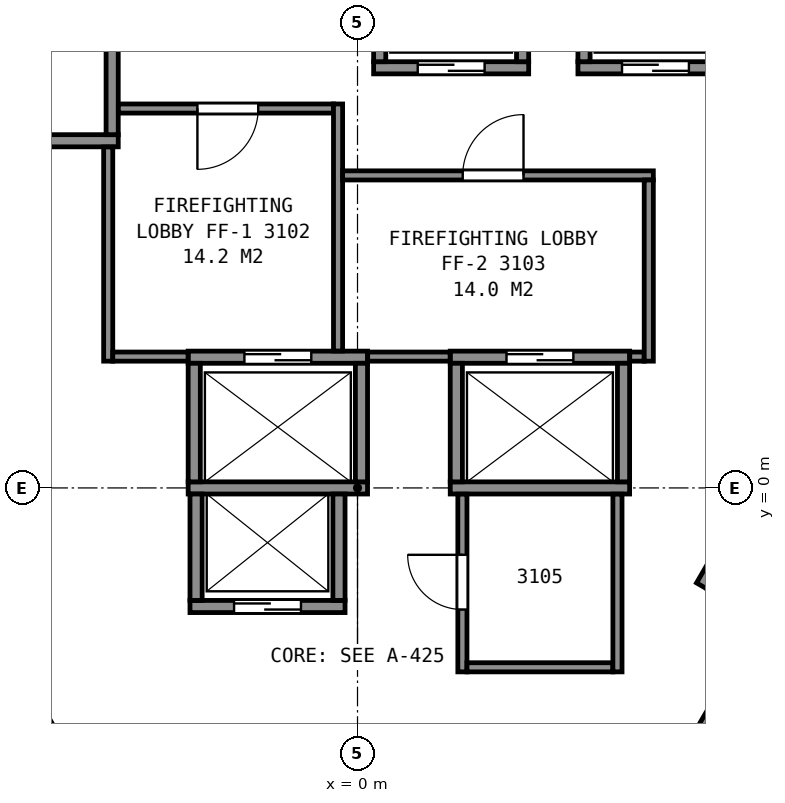
"""IFC4 building model, lengths in metres.
Left out: names, types, materials, properties, quantities, classifications, styles, units other than length and angle.
Written with IfcOpenShell. Run it as: python <this file> out.ifc"""

import sys

from ifc_helpers import new_model, si_unit, direction, frame, frame_2d, origin, place, context, subcontext, project, spatial, rectangle, extrude, element, fill, save


model = new_model("IFC4")
c1 = context("Model", 3, precision=1e-05, world=origin(), true_north=direction((0.0, 1.0)))
c2 = subcontext(c1, "Body", "Model", "MODEL_VIEW")
j1 = project(units=[si_unit("LENGTHUNIT", "METRE"), si_unit("PLANEANGLEUNIT", "RADIAN")], contexts=[c1])
p1 = place(None, origin())
s1 = spatial("IfcSite", under=j1, at=p1, CompositionType="ELEMENT")
p2 = place(p1, origin())
s2 = spatial("IfcBuilding", under=s1, at=p2, CompositionType="ELEMENT")
p3 = place(p2, frame((0.0, 0.0, 128.8)))
s3 = spatial("IfcBuildingStorey", under=s2, at=p3, CompositionType="ELEMENT", Elevation=128.8)
p4 = place(p3, frame((-2.755, -1.95, 0.0), z_axis=(0.0, 0.0, 1.0), x_axis=(1.0, 0.0, 0.0)))
e1 = element("IfcWall", 1, at=p4, inside=s3, PredefinedType="PARTITIONING", context=c2, shape_type="SweptSolid", body=[
    extrude(rectangle(XDim=2.55, YDim=0.2, at=frame_2d((1.275, 0.0))), origin(), (0.0, 0.0, 1.0), 3.6),
])
p5 = place(p4, frame((0.725, 0.0, 0.0)))
e2 = element("IfcOpeningElement", 2, at=p5, cuts=e1, PredefinedType="OPENING", context=c2, shape_type="SweptSolid", body=[
    extrude(rectangle(XDim=1.1, YDim=2.1, at=frame_2d((0.55, 1.05))), frame((0.0, 0.11, 0.0), z_axis=(0.0, -1.0, 0.0), x_axis=(1.0, 0.0, 0.0)), (0.0, 0.0, 1.0), 0.22),
])
p6 = place(p3, frame((-2.785, 0.0, 0.0), z_axis=(0.0, 0.0, 1.0), x_axis=(1.0, 0.0, 0.0)))
e3 = element("IfcWall", 3, at=p6, inside=s3, PredefinedType="PARTITIONING", context=c2, shape_type="SweptSolid", body=[
    extrude(rectangle(XDim=2.95, YDim=0.2, at=frame_2d((1.475, 0.0))), origin(), (0.0, 0.0, 1.0), 3.6),
])
p7 = place(p3, frame((1.525, 0.0, 0.0), z_axis=(0.0, 0.0, 1.0), x_axis=(1.0, 0.0, 0.0)))
e4 = element("IfcWall", 4, at=p7, inside=s3, PredefinedType="PARTITIONING", context=c2, shape_type="SweptSolid", body=[
    extrude(rectangle(XDim=2.95, YDim=0.2, at=frame_2d((1.475, 0.0))), origin(), (0.0, 0.0, 1.0), 3.6),
])
p8 = place(p3, frame((-2.785, 2.15, 0.0), z_axis=(0.0, 0.0, 1.0), x_axis=(1.0, 0.0, 0.0)))
e5 = element("IfcWall", 5, at=p8, inside=s3, PredefinedType="PARTITIONING", context=c2, shape_type="SweptSolid", body=[
    extrude(rectangle(XDim=2.95, YDim=0.2, at=frame_2d((1.475, 0.0))), origin(), (0.0, 0.0, 1.0), 3.6),
])
p9 = place(p8, frame((0.925, 0.0, 0.0)))
e6 = element("IfcOpeningElement", 6, at=p9, cuts=e5, PredefinedType="OPENING", context=c2, shape_type="SweptSolid", body=[
    extrude(rectangle(XDim=1.1, YDim=2.1, at=frame_2d((0.55, 1.05))), frame((0.0, 0.11, 0.0), z_axis=(0.0, -1.0, 0.0), x_axis=(1.0, 0.0, 0.0)), (0.0, 0.0, 1.0), 0.22),
])
p10 = place(p3, frame((1.525, 2.15, 0.0), z_axis=(0.0, 0.0, 1.0), x_axis=(1.0, 0.0, 0.0)))
e7 = element("IfcWall", 7, at=p10, inside=s3, PredefinedType="PARTITIONING", context=c2, shape_type="SweptSolid", body=[
    extrude(rectangle(XDim=2.95, YDim=0.2, at=frame_2d((1.475, 0.0))), origin(), (0.0, 0.0, 1.0), 3.6),
])
p11 = place(p10, frame((0.925, 0.0, 0.0)))
e8 = element("IfcOpeningElement", 8, at=p11, cuts=e7, PredefinedType="OPENING", context=c2, shape_type="SweptSolid", body=[
    extrude(rectangle(XDim=1.1, YDim=2.1, at=frame_2d((0.55, 1.05))), frame((0.0, 0.11, 0.0), z_axis=(0.0, -1.0, 0.0), x_axis=(1.0, 0.0, 0.0)), (0.0, 0.0, 1.0), 0.22),
])
p12 = place(p3, frame((-6.285, 5.71, 0.0), z_axis=(0.0, 0.0, 1.0), x_axis=(1.0, 0.0, 0.0)))
e9 = element("IfcWall", 9, at=p12, inside=s3, PredefinedType="PARTITIONING", context=c2, shape_type="SweptSolid", body=[
    extrude(rectangle(XDim=2.35, YDim=0.2, at=frame_2d((1.175, 0.0))), origin(), (0.0, 0.0, 1.0), 3.6),
])
p13 = place(p3, frame((0.265, 6.91, 0.0), z_axis=(0.0, 0.0, 1.0), x_axis=(1.0, 0.0, 0.0)))
e10 = element("IfcWall", 10, at=p13, inside=s3, PredefinedType="PARTITIONING", context=c2, shape_type="SweptSolid", body=[
    extrude(rectangle(XDim=2.55, YDim=0.2, at=frame_2d((1.275, 0.0))), origin(), (0.0, 0.0, 1.0), 3.6),
])
p14 = place(p13, frame((0.725, 0.0, 0.0)))
e11 = element("IfcOpeningElement", 11, at=p14, cuts=e10, PredefinedType="OPENING", context=c2, shape_type="SweptSolid", body=[
    extrude(rectangle(XDim=1.1, YDim=2.1, at=frame_2d((0.55, 1.05))), frame((0.0, 0.11, 0.0), z_axis=(0.0, -1.0, 0.0), x_axis=(1.0, 0.0, 0.0)), (0.0, 0.0, 1.0), 0.22),
])
p15 = place(p3, frame((3.625, 6.91, 0.0), z_axis=(0.0, 0.0, 1.0), x_axis=(1.0, 0.0, 0.0)))
e12 = element("IfcWall", 12, at=p15, inside=s3, PredefinedType="PARTITIONING", context=c2, shape_type="SweptSolid", body=[
    extrude(rectangle(XDim=2.55, YDim=0.2, at=frame_2d((1.275, 0.0))), origin(), (0.0, 0.0, 1.0), 3.6),
])
p16 = place(p15, frame((0.725, 0.0, 0.0)))
e13 = element("IfcOpeningElement", 13, at=p16, cuts=e12, PredefinedType="OPENING", context=c2, shape_type="SweptSolid", body=[
    extrude(rectangle(XDim=1.1, YDim=2.1, at=frame_2d((0.55, 1.05))), frame((0.0, 0.11, 0.0), z_axis=(0.0, -1.0, 0.0), x_axis=(1.0, 0.0, 0.0)), (0.0, 0.0, 1.0), 0.22),
])
p17 = place(p3, frame((5.527, -4.247, 0.0), z_axis=(0.0, 0.0, 1.0), x_axis=(0.499938297808, 0.866061024631, 0.0)))
e14 = element("IfcWall", 14, at=p17, inside=s3, PredefinedType="PARTITIONING", context=c2, shape_type="SweptSolid", body=[
    extrude(rectangle(XDim=2.35, YDim=0.2, at=frame_2d((1.175, 0.0))), origin(), (0.0, 0.0, 1.0), 3.6),
])
p18 = place(p17, frame((0.725, 0.0, 0.0)))
e15 = element("IfcOpeningElement", 15, at=p18, cuts=e14, PredefinedType="OPENING", context=c2, shape_type="SweptSolid", body=[
    extrude(rectangle(XDim=1.1, YDim=2.1, at=frame_2d((0.55, 1.05))), frame((0.0, 0.11, 0.0), z_axis=(0.0, -1.0, 0.0), x_axis=(1.0, 0.0, 0.0)), (0.0, 0.0, 1.0), 0.22),
])
p19 = place(p3, frame((5.663, -1.612, 0.0), z_axis=(0.0, 0.0, 1.0), x_axis=(0.49998122708, 0.866036242063, 0.0)))
e16 = element("IfcWall", 16, at=p19, inside=s3, PredefinedType="PARTITIONING", context=c2, shape_type="SweptSolid", body=[
    extrude(rectangle(XDim=4.9, YDim=0.2, at=frame_2d((2.45, 0.0))), origin(), (0.0, 0.0, 1.0), 3.6),
])
p20 = place(p3, frame((4.375, 0.1, 0.0), z_axis=(0.0, 0.0, 1.0), x_axis=(0.0, 1.0, 0.0)))
e17 = element("IfcWall", 17, at=p20, inside=s3, PredefinedType="PARTITIONING", context=c2, shape_type="SweptSolid", body=[
    extrude(rectangle(XDim=1.95, YDim=0.2, at=frame_2d((0.975, 0.0))), origin(), (0.0, 0.0, 1.0), 3.6),
])
for number, where, z_axis, x_axis in (
    (18, (3.725, 7.01, 0.0), (0.0, 0.0, 1.0), (0.0, 1.0, 0.0)),
    (19, (2.715, 7.01, 0.0), (0.0, 0.0, 1.0), (0.0, 1.0, 0.0)),
):
    element("IfcWall", number, at=place(p3, frame(where, z_axis=z_axis, x_axis=x_axis)), inside=s3, PredefinedType="PARTITIONING", context=c2, shape_type="SweptSolid", body=[
        extrude(rectangle(XDim=1.75, YDim=0.2, at=frame_2d((0.875, 0.0))), origin(), (0.0, 0.0, 1.0), 3.6),
    ])
p21 = place(p3, frame((1.625, 0.1, 0.0), z_axis=(0.0, 0.0, 1.0), x_axis=(0.0, 1.0, 0.0)))
e20 = element("IfcWall", 20, at=p21, inside=s3, PredefinedType="PARTITIONING", context=c2, shape_type="SweptSolid", body=[
    extrude(rectangle(XDim=1.95, YDim=0.2, at=frame_2d((0.975, 0.0))), origin(), (0.0, 0.0, 1.0), 3.6),
])
p22 = place(p3, frame((0.365, 7.01, 0.0), z_axis=(0.0, 0.0, 1.0), x_axis=(0.0, 1.0, 0.0)))
e21 = element("IfcWall", 21, at=p22, inside=s3, PredefinedType="PARTITIONING", context=c2, shape_type="SweptSolid", body=[
    extrude(rectangle(XDim=1.75, YDim=0.2, at=frame_2d((0.875, 0.0))), origin(), (0.0, 0.0, 1.0), 3.6),
])
p23 = place(p3, frame((0.065, 0.1, 0.0), z_axis=(0.0, 0.0, 1.0), x_axis=(0.0, 1.0, 0.0)))
e22 = element("IfcWall", 22, at=p23, inside=s3, PredefinedType="PARTITIONING", context=c2, shape_type="SweptSolid", body=[
    extrude(rectangle(XDim=1.95, YDim=0.2, at=frame_2d((0.975, 0.0))), origin(), (0.0, 0.0, 1.0), 3.6),
])
for number, where, z_axis, x_axis in (
    (23, (-0.305, -1.85, 0.0), (0.0, 0.0, 1.0), (0.0, 1.0, 0.0)),
    (24, (-2.655, -1.85, 0.0), (0.0, 0.0, 1.0), (0.0, 1.0, 0.0)),
):
    element("IfcWall", number, at=place(p3, frame(where, z_axis=z_axis, x_axis=x_axis)), inside=s3, PredefinedType="PARTITIONING", context=c2, shape_type="SweptSolid", body=[
        extrude(rectangle(XDim=1.75, YDim=0.2, at=frame_2d((0.875, 0.0))), origin(), (0.0, 0.0, 1.0), 3.6),
    ])
p24 = place(p3, frame((-2.685, 0.1, 0.0), z_axis=(0.0, 0.0, 1.0), x_axis=(0.0, 1.0, 0.0)))
e25 = element("IfcWall", 25, at=p24, inside=s3, PredefinedType="PARTITIONING", context=c2, shape_type="SweptSolid", body=[
    extrude(rectangle(XDim=1.95, YDim=0.2, at=frame_2d((0.975, 0.0))), origin(), (0.0, 0.0, 1.0), 3.6),
])
p25 = place(p3, frame((-4.035, 5.81, 0.0), z_axis=(0.0, 0.0, 1.0), x_axis=(0.0, 1.0, 0.0)))
e26 = element("IfcWall", 26, at=p25, inside=s3, PredefinedType="PARTITIONING", context=c2, shape_type="SweptSolid", body=[
    extrude(rectangle(XDim=1.75, YDim=0.2, at=frame_2d((0.875, 0.0))), origin(), (0.0, 0.0, 1.0), 3.6),
])
p26 = place(p3, frame((-13.664, 5.946, 0.0), z_axis=(0.0, 0.0, 1.0), x_axis=(0.499994327219, -0.866028678941, 0.0)))
e27 = element("IfcWall", 27, at=p26, inside=s3, PredefinedType="PARTITIONING", context=c2, shape_type="SweptSolid", body=[
    extrude(rectangle(XDim=23.968, YDim=0.2, at=frame_2d((11.984, 0.0))), origin(), (0.0, 0.0, 1.0), 3.35),
])
p27 = place(p3, frame((-4.091, -5.635, 0.0), z_axis=(0.0, 0.0, 1.0), x_axis=(-0.499948934428, 0.866054884499, 0.0)))
e28 = element("IfcWall", 28, at=p27, inside=s3, PredefinedType="PARTITIONING", context=c2, shape_type="SweptSolid", body=[
    extrude(rectangle(XDim=3.577, YDim=0.15, at=frame_2d((1.789, 0.0))), origin(), (0.0, 0.0, 1.0), 3.35),
])
p28 = place(p27, frame((2.377, 0.0, 0.0)))
e29 = element("IfcOpeningElement", 29, at=p28, cuts=e28, PredefinedType="OPENING", context=c2, shape_type="SweptSolid", body=[
    extrude(rectangle(XDim=0.9, YDim=2.1, at=frame_2d((0.45, 1.05))), frame((0.0, 0.085, 0.0), z_axis=(0.0, -1.0, 0.0), x_axis=(1.0, 0.0, 0.0)), (0.0, 0.0, 1.0), 0.17),
])
p29 = place(p27, frame((0.605, 0.0, 0.0)))
e30 = element("IfcOpeningElement", 30, at=p29, cuts=e28, PredefinedType="OPENING", context=c2, shape_type="SweptSolid", body=[
    extrude(rectangle(XDim=0.9, YDim=2.1, at=frame_2d((0.45, 1.05))), frame((0.0, 0.085, 0.0), z_axis=(0.0, -1.0, 0.0), x_axis=(1.0, 0.0, 0.0)), (0.0, 0.0, 1.0), 0.17),
])
p30 = place(p3, frame((-4.1, 2.085, 0.0), z_axis=(0.0, 0.0, 1.0), x_axis=(0.0, 1.0, 0.0)))
e31 = element("IfcWall", 31, at=p30, inside=s3, PredefinedType="PARTITIONING", context=c2, shape_type="SweptSolid", body=[
    extrude(rectangle(XDim=3.523, YDim=0.15, at=frame_2d((1.761, 0.0))), origin(), (0.0, 0.0, 1.0), 3.35),
])
p31 = place(p3, frame((-4.025, 2.16, 0.0), z_axis=(0.0, 0.0, 1.0), x_axis=(1.0, 0.0, 0.0)))
e32 = element("IfcWall", 32, at=p31, inside=s3, PredefinedType="PARTITIONING", context=c2, shape_type="SweptSolid", body=[
    extrude(rectangle(XDim=1.238, YDim=0.15, at=frame_2d((0.619, 0.0))), origin(), (0.0, 0.0, 1.0), 3.35),
])
p32 = place(p3, frame((-3.933, 6.24, 0.0), z_axis=(0.0, 0.0, 1.0), x_axis=(1.0, 0.0, 0.0)))
e33 = element("IfcWall", 33, at=p32, inside=s3, PredefinedType="PARTITIONING", context=c2, shape_type="SweptSolid", body=[
    extrude(rectangle(XDim=3.538, YDim=0.15, at=frame_2d((1.769, 0.0))), origin(), (0.0, 0.0, 1.0), 3.35),
])
p33 = place(p32, frame((1.3, 0.0, 0.0)))
e34 = element("IfcOpeningElement", 34, at=p33, cuts=e33, PredefinedType="OPENING", context=c2, shape_type="SweptSolid", body=[
    extrude(rectangle(XDim=1.0, YDim=2.1, at=frame_2d((0.5, 1.05))), frame((0.0, 0.085, 0.0), z_axis=(0.0, -1.0, 0.0), x_axis=(1.0, 0.0, 0.0)), (0.0, 0.0, 1.0), 0.17),
])
p34 = place(p3, frame((-0.32, 2.252, 0.0), z_axis=(0.0, 0.0, 1.0), x_axis=(0.0, 1.0, 0.0)))
e35 = element("IfcWall", 35, at=p34, inside=s3, PredefinedType="PARTITIONING", context=c2, shape_type="SweptSolid", body=[
    extrude(rectangle(XDim=4.063, YDim=0.15, at=frame_2d((2.031, 0.0))), origin(), (0.0, 0.0, 1.0), 3.35),
])
p35 = place(p3, frame((-0.245, 5.14, 0.0), z_axis=(0.0, 0.0, 1.0), x_axis=(1.0, 0.0, 0.0)))
e36 = element("IfcWall", 36, at=p35, inside=s3, PredefinedType="PARTITIONING", context=c2, shape_type="SweptSolid", body=[
    extrude(rectangle(XDim=5.11, YDim=0.15, at=frame_2d((2.555, 0.0))), origin(), (0.0, 0.0, 1.0), 3.35),
])
p36 = place(p35, frame((1.975, 0.0, 0.0)))
e37 = element("IfcOpeningElement", 37, at=p36, cuts=e36, PredefinedType="OPENING", context=c2, shape_type="SweptSolid", body=[
    extrude(rectangle(XDim=1.0, YDim=2.1, at=frame_2d((0.5, 1.05))), frame((0.0, 0.085, 0.0), z_axis=(0.0, -1.0, 0.0), x_axis=(1.0, 0.0, 0.0)), (0.0, 0.0, 1.0), 0.17),
])
p37 = place(p3, frame((0.167, 2.16, 0.0), z_axis=(0.0, 0.0, 1.0), x_axis=(1.0, 0.0, 0.0)))
e38 = element("IfcWall", 38, at=p37, inside=s3, PredefinedType="PARTITIONING", context=c2, shape_type="SweptSolid", body=[
    extrude(rectangle(XDim=1.356, YDim=0.15, at=frame_2d((0.678, 0.0))), origin(), (0.0, 0.0, 1.0), 3.35),
])
p38 = place(p3, frame((1.725, -0.102, 0.0), z_axis=(0.0, 0.0, 1.0), x_axis=(0.0, -1.0, 0.0)))
e39 = element("IfcWall", 39, at=p38, inside=s3, PredefinedType="PARTITIONING", context=c2, shape_type="SweptSolid", body=[
    extrude(rectangle(XDim=2.923, YDim=0.15, at=frame_2d((1.461, 0.0))), origin(), (0.0, 0.0, 1.0), 3.35),
])
p39 = place(p38, frame((0.998, 0.0, 0.0)))
e40 = element("IfcOpeningElement", 40, at=p39, cuts=e39, PredefinedType="OPENING", context=c2, shape_type="SweptSolid", body=[
    extrude(rectangle(XDim=0.9, YDim=2.1, at=frame_2d((0.45, 1.05))), frame((0.0, 0.085, 0.0), z_axis=(0.0, -1.0, 0.0), x_axis=(1.0, 0.0, 0.0)), (0.0, 0.0, 1.0), 0.17),
])
p40 = place(p3, frame((1.8, -2.95, 0.0), z_axis=(0.0, 0.0, 1.0), x_axis=(1.0, 0.0, 0.0)))
e41 = element("IfcWall", 41, at=p40, inside=s3, PredefinedType="PARTITIONING", context=c2, shape_type="SweptSolid", body=[
    extrude(rectangle(XDim=2.4, YDim=0.15, at=frame_2d((1.2, 0.0))), origin(), (0.0, 0.0, 1.0), 3.35),
])
p41 = place(p3, frame((4.275, -3.025, 0.0), z_axis=(0.0, 0.0, 1.0), x_axis=(0.0, 1.0, 0.0)))
e42 = element("IfcWall", 42, at=p41, inside=s3, PredefinedType="PARTITIONING", context=c2, shape_type="SweptSolid", body=[
    extrude(rectangle(XDim=2.923, YDim=0.15, at=frame_2d((1.461, 0.0))), origin(), (0.0, 0.0, 1.0), 3.35),
])
p42 = place(p3, frame((4.477, 2.16, 0.0), z_axis=(0.0, 0.0, 1.0), x_axis=(1.0, 0.0, 0.0)))
e43 = element("IfcWall", 43, at=p42, inside=s3, PredefinedType="PARTITIONING", context=c2, shape_type="SweptSolid", body=[
    extrude(rectangle(XDim=0.238, YDim=0.15, at=frame_2d((0.119, 0.0))), origin(), (0.0, 0.0, 1.0), 3.35),
])
p43 = place(p3, frame((4.79, 2.085, 0.0), z_axis=(0.0, 0.0, 1.0), x_axis=(0.0, 1.0, 0.0)))
e44 = element("IfcWall", 44, at=p43, inside=s3, PredefinedType="PARTITIONING", context=c2, shape_type="SweptSolid", body=[
    extrude(rectangle(XDim=2.98, YDim=0.15, at=frame_2d((1.49, 0.0))), origin(), (0.0, 0.0, 1.0), 3.35),
])
p44 = place(p3, frame((-3.756, -15.494, 0.0), z_axis=(0.0, 0.0, 1.0), x_axis=(-0.500027787016, 0.866009360349, 0.0)))
e45 = element("IfcWall", 45, at=p44, inside=s3, PredefinedType="PARTITIONING", context=c2, shape_type="SweptSolid", body=[
    extrude(rectangle(XDim=23.856, YDim=0.125, at=frame_2d((11.928, 0.0))), origin(), (0.0, 0.0, 1.0), 2.613),
])
p45 = place(p44, frame((10.016, 0.0, 0.0)))
e46 = element("IfcOpeningElement", 46, at=p45, cuts=e45, PredefinedType="OPENING", context=c2, shape_type="SweptSolid", body=[
    extrude(rectangle(XDim=1.0, YDim=2.1, at=frame_2d((0.5, 1.05))), frame((0.0, 0.073, 0.0), z_axis=(0.0, -1.0, 0.0), x_axis=(1.0, 0.0, 0.0)), (0.0, 0.0, 1.0), 0.145),
])
p46 = place(p44, frame((6.402, 0.0, 0.0)))
e47 = element("IfcOpeningElement", 47, at=p46, cuts=e45, PredefinedType="OPENING", context=c2, shape_type="SweptSolid", body=[
    extrude(rectangle(XDim=0.9, YDim=2.1, at=frame_2d((0.45, 1.05))), frame((0.0, 0.073, 0.0), z_axis=(0.0, -1.0, 0.0), x_axis=(1.0, 0.0, 0.0)), (0.0, 0.0, 1.0), 0.145),
])
p47 = place(p3, frame((15.684, 5.165, 0.0), z_axis=(0.0, 0.0, 1.0), x_axis=(-0.500027787016, -0.866009360349, 0.0)))
e48 = element("IfcWall", 48, at=p47, inside=s3, PredefinedType="PARTITIONING", context=c2, shape_type="SweptSolid", body=[
    extrude(rectangle(XDim=23.856, YDim=0.125, at=frame_2d((11.928, 0.0))), origin(), (0.0, 0.0, 1.0), 2.613),
])
p48 = place(p47, frame((21.493, 0.0, 0.0)))
e49 = element("IfcOpeningElement", 49, at=p48, cuts=e48, PredefinedType="OPENING", context=c2, shape_type="SweptSolid", body=[
    extrude(rectangle(XDim=1.0, YDim=2.1, at=frame_2d((0.5, 1.05))), frame((0.0, 0.073, 0.0), z_axis=(0.0, -1.0, 0.0), x_axis=(1.0, 0.0, 0.0)), (0.0, 0.0, 1.0), 0.145),
])
p49 = place(p47, frame((10.853, 0.0, 0.0)))
e50 = element("IfcOpeningElement", 50, at=p49, cuts=e48, PredefinedType="OPENING", context=c2, shape_type="SweptSolid", body=[
    extrude(rectangle(XDim=0.9, YDim=2.1, at=frame_2d((0.45, 1.05))), frame((0.0, 0.073, 0.0), z_axis=(0.0, -1.0, 0.0), x_axis=(1.0, 0.0, 0.0)), (0.0, 0.0, 1.0), 0.145),
])
p50 = place(p47, frame((6.558, 0.0, 0.0)))
e51 = element("IfcOpeningElement", 51, at=p50, cuts=e48, PredefinedType="OPENING", context=c2, shape_type="SweptSolid", body=[
    extrude(rectangle(XDim=1.0, YDim=2.1, at=frame_2d((0.5, 1.05))), frame((0.0, 0.073, 0.0), z_axis=(0.0, -1.0, 0.0), x_axis=(1.0, 0.0, 0.0)), (0.0, 0.0, 1.0), 0.145),
])
p51 = place(p14, origin())
e52 = element("IfcDoor", 52, at=p51, inside=s3, OperationType="SLIDING_TO_LEFT", PredefinedType="DOOR", context=c2, shape_type="SweptSolid", body=[
    extrude(rectangle(XDim=1.1, YDim=2.1, at=frame_2d((0.55, 1.05))), frame((0.0, 0.025, 0.0), z_axis=(0.0, -1.0, 0.0), x_axis=(1.0, 0.0, 0.0)), (0.0, 0.0, 1.0), 0.05),
])
fill(e11, e52)
p52 = place(p5, origin())
e53 = element("IfcDoor", 53, at=p52, inside=s3, OperationType="SLIDING_TO_RIGHT", PredefinedType="DOOR", context=c2, shape_type="SweptSolid", body=[
    extrude(rectangle(XDim=1.1, YDim=2.1, at=frame_2d((0.55, 1.05))), frame((0.0, 0.025, 0.0), z_axis=(0.0, -1.0, 0.0), x_axis=(1.0, 0.0, 0.0)), (0.0, 0.0, 1.0), 0.05),
])
fill(e2, e53)
p53 = place(p16, origin())
e54 = element("IfcDoor", 54, at=p53, inside=s3, OperationType="SLIDING_TO_LEFT", PredefinedType="DOOR", context=c2, shape_type="SweptSolid", body=[
    extrude(rectangle(XDim=1.1, YDim=2.1, at=frame_2d((0.55, 1.05))), frame((0.0, 0.025, 0.0), z_axis=(0.0, -1.0, 0.0), x_axis=(1.0, 0.0, 0.0)), (0.0, 0.0, 1.0), 0.05),
])
fill(e13, e54)
p54 = place(p9, origin())
e55 = element("IfcDoor", 55, at=p54, inside=s3, OperationType="SLIDING_TO_LEFT", PredefinedType="DOOR", context=c2, shape_type="SweptSolid", body=[
    extrude(rectangle(XDim=1.1, YDim=2.1, at=frame_2d((0.55, 1.05))), frame((0.0, 0.025, 0.0), z_axis=(0.0, -1.0, 0.0), x_axis=(1.0, 0.0, 0.0)), (0.0, 0.0, 1.0), 0.05),
])
fill(e6, e55)
p55 = place(p11, origin())
e56 = element("IfcDoor", 56, at=p55, inside=s3, OperationType="SLIDING_TO_RIGHT", PredefinedType="DOOR", context=c2, shape_type="SweptSolid", body=[
    extrude(rectangle(XDim=1.1, YDim=2.1, at=frame_2d((0.55, 1.05))), frame((0.0, 0.025, 0.0), z_axis=(0.0, -1.0, 0.0), x_axis=(1.0, 0.0, 0.0)), (0.0, 0.0, 1.0), 0.05),
])
fill(e8, e56)
p56 = place(p33, origin())
e57 = element("IfcDoor", 57, at=p56, inside=s3, OperationType="SINGLE_SWING_LEFT", PredefinedType="DOOR", context=c2, shape_type="SweptSolid", body=[
    extrude(rectangle(XDim=1.0, YDim=2.1, at=frame_2d((0.5, 1.05))), frame((0.0, 0.025, 0.0), z_axis=(0.0, -1.0, 0.0), x_axis=(1.0, 0.0, 0.0)), (0.0, 0.0, 1.0), 0.05),
])
fill(e34, e57)
p57 = place(p36, origin())
e58 = element("IfcDoor", 58, at=p57, inside=s3, OperationType="SINGLE_SWING_RIGHT", PredefinedType="DOOR", context=c2, shape_type="SweptSolid", body=[
    extrude(rectangle(XDim=1.0, YDim=2.1, at=frame_2d((0.5, 1.05))), frame((0.0, 0.025, 0.0), z_axis=(0.0, -1.0, 0.0), x_axis=(1.0, 0.0, 0.0)), (0.0, 0.0, 1.0), 0.05),
])
fill(e37, e58)
p58 = place(p39, origin())
e59 = element("IfcDoor", 59, at=p58, inside=s3, OperationType="SINGLE_SWING_LEFT", PredefinedType="DOOR", context=c2, shape_type="SweptSolid", body=[
    extrude(rectangle(XDim=0.9, YDim=2.1, at=frame_2d((0.45, 1.05))), frame((0.0, 0.025, 0.0), z_axis=(0.0, -1.0, 0.0), x_axis=(1.0, 0.0, 0.0)), (0.0, 0.0, 1.0), 0.05),
])
fill(e40, e59)
save(model, sys.argv[1])
